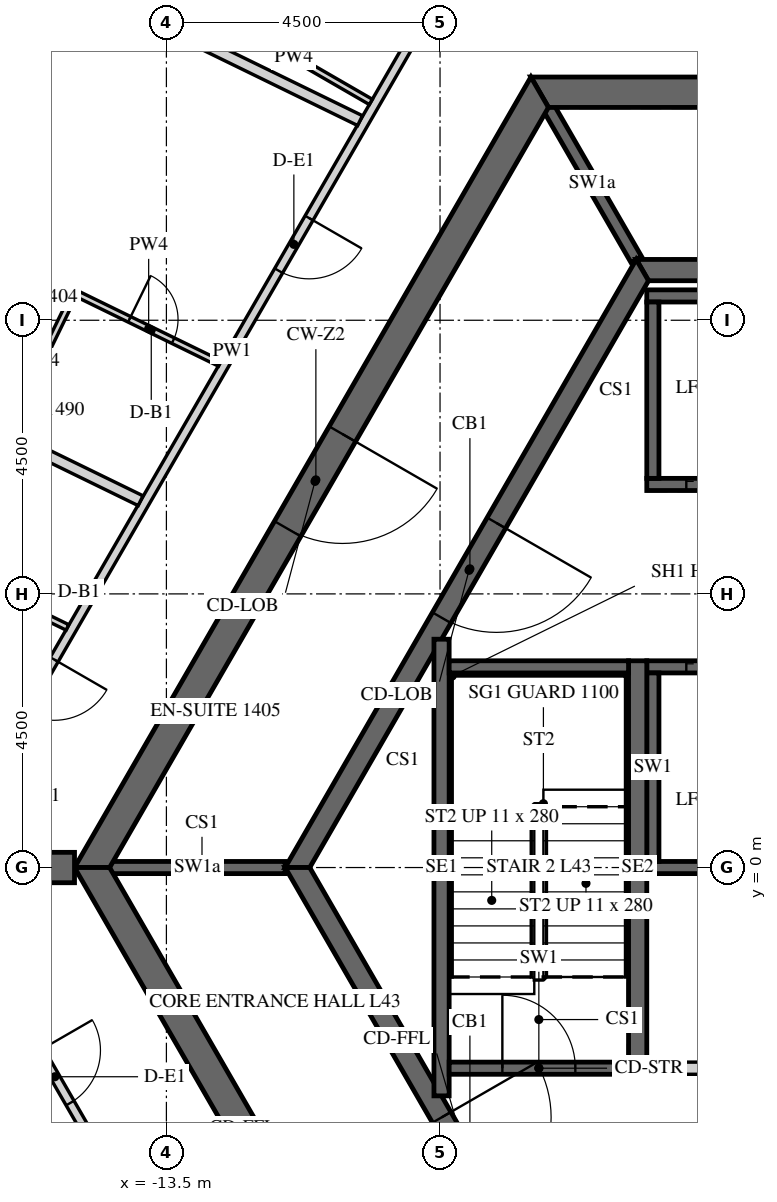
"""IFC4 building model, lengths in metres.
Left out: names, types, materials, properties, quantities, classifications, styles, units other than length and angle.
Written with IfcOpenShell. Run it as: python <this file> out.ifc"""

import sys

from ifc_helpers import new_model, si_unit, direction, frame, frame_2d, origin, place, context, subcontext, project, spatial, polyline, rectangle, outline, extrude, element, fill, save


model = new_model("IFC4")
c1 = context("Model", 3, precision=1e-05, world=origin(), true_north=direction((0.0, 1.0)))
c2 = subcontext(c1, "Body", "Model", "MODEL_VIEW")
j1 = project(units=[si_unit("LENGTHUNIT", "METRE"), si_unit("PLANEANGLEUNIT", "RADIAN")], contexts=[c1])
p1 = place(None, origin())
s1 = spatial("IfcSite", under=j1, at=p1, CompositionType="ELEMENT")
p2 = place(p1, origin())
s2 = spatial("IfcBuilding", under=s1, at=p2, CompositionType="ELEMENT")
p3 = place(p2, frame((0.0, 0.0, 183.9)))
s3 = spatial("IfcBuildingStorey", under=s2, at=p3, CompositionType="ELEMENT", Elevation=183.9)
p4 = place(p3, frame((-7.361, 12.75, -0.15), z_axis=(0.0, 0.0, 1.0), x_axis=(-0.50000571537, -0.866022103989, 0.0)))
e1 = element("IfcWall", 1, at=p4, inside=s3, PredefinedType="SHEAR", context=c2, shape_type="SweptSolid", body=[
    extrude(outline(polyline([(-0.144, -0.25), (14.867, -0.25), (14.578, 0.25), (0.144, 0.25), (-0.144, -0.25)])), origin(), (0.0, 0.0, 1.0), 3.9),
])
p5 = place(p4, frame((6.49, 0.0, 0.15)))
e2 = element("IfcOpeningElement", 2, at=p5, cuts=e1, PredefinedType="OPENING", context=c2, shape_type="SweptSolid", body=[
    extrude(rectangle(XDim=1.8, YDim=2.4, at=frame_2d((0.9, 1.2))), frame((0.0, 0.26, 0.0), z_axis=(0.0, -1.0, 0.0), x_axis=(1.0, 0.0, 0.0)), (0.0, 0.0, 1.0), 0.52),
])
p6 = place(p3, frame((-14.722, 0.0, -0.15), z_axis=(0.0, 0.0, 1.0), x_axis=(0.50000571537, -0.866022103989, 0.0)))
e3 = element("IfcWall", 3, at=p6, inside=s3, PredefinedType="SHEAR", context=c2, shape_type="SweptSolid", body=[
    extrude(outline(polyline([(-0.144, -0.25), (14.867, -0.25), (14.578, 0.25), (0.144, 0.25), (-0.144, -0.25)])), origin(), (0.0, 0.0, 1.0), 3.9),
])
p7 = place(p6, frame((6.432, 0.0, 0.15)))
e4 = element("IfcOpeningElement", 4, at=p7, cuts=e3, PredefinedType="OPENING", context=c2, shape_type="SweptSolid", body=[
    extrude(rectangle(XDim=1.8, YDim=2.4, at=frame_2d((0.9, 1.2))), frame((0.0, 0.26, 0.0), z_axis=(0.0, -1.0, 0.0), x_axis=(1.0, 0.0, 0.0)), (0.0, 0.0, 1.0), 0.52),
])
p8 = place(p3, frame((7.361, 12.75, -0.15), z_axis=(0.0, 0.0, 1.0), x_axis=(-1.0, 0.0, 0.0)))
e5 = element("IfcWall", 5, at=p8, inside=s3, PredefinedType="SHEAR", context=c2, shape_type="SweptSolid", body=[
    extrude(outline(polyline([(-0.144, -0.25), (14.866, -0.25), (14.578, 0.25), (0.144, 0.25), (-0.144, -0.25)])), origin(), (0.0, 0.0, 1.0), 3.9),
])
p9 = place(p8, frame((6.761, 0.0, 0.15)))
e6 = element("IfcOpeningElement", 6, at=p9, cuts=e5, PredefinedType="OPENING", context=c2, shape_type="SweptSolid", body=[
    extrude(rectangle(XDim=1.2, YDim=2.4, at=frame_2d((0.6, 1.2))), frame((0.0, 0.26, 0.0), z_axis=(0.0, -1.0, 0.0), x_axis=(1.0, 0.0, 0.0)), (0.0, 0.0, 1.0), 0.52),
])
p10 = place(p3, frame((-15.011, 0.0, -0.15), z_axis=(0.0, 0.0, 1.0), x_axis=(-1.0, 0.0, 0.0)))
e7 = element("IfcWall", 7, at=p10, inside=s3, PredefinedType="SHEAR", context=c2, shape_type="SweptSolid", body=[
    extrude(rectangle(XDim=15.424, YDim=0.5, at=frame_2d((7.712, 0.0))), origin(), (0.0, 0.0, 1.0), 3.9),
])
p11 = place(p10, frame((6.812, 0.0, 0.15)))
e8 = element("IfcOpeningElement", 8, at=p11, cuts=e7, PredefinedType="OPENING", context=c2, shape_type="SweptSolid", body=[
    extrude(rectangle(XDim=1.8, YDim=2.4, at=frame_2d((0.9, 1.2))), frame((0.0, 0.26, 0.0), z_axis=(0.0, -1.0, 0.0), x_axis=(1.0, 0.0, 0.0)), (0.0, 0.0, 1.0), 0.52),
])
p12 = place(p3, frame((-5.673, 9.825, -0.15), z_axis=(0.0, 0.0, 1.0), x_axis=(-0.499995046907, -0.866028263435, 0.0)))
e9 = element("IfcWall", 9, at=p12, inside=s3, PredefinedType="SHEAR", context=c2, shape_type="SweptSolid", body=[
    extrude(outline(polyline([(-0.101, -0.175), (11.446, -0.175), (11.244, 0.175), (0.101, 0.175), (-0.101, -0.175)])), origin(), (0.0, 0.0, 1.0), 3.9),
])
p13 = place(p12, frame((4.801, 0.0, 0.15)))
e10 = element("IfcOpeningElement", 10, at=p13, cuts=e9, PredefinedType="OPENING", context=c2, shape_type="SweptSolid", body=[
    extrude(rectangle(XDim=1.8, YDim=2.4, at=frame_2d((0.9, 1.2))), frame((0.0, 0.185, 0.0), z_axis=(0.0, -1.0, 0.0), x_axis=(1.0, 0.0, 0.0)), (0.0, 0.0, 1.0), 0.37),
])
p14 = place(p3, frame((-11.345, 0.0, -0.15), z_axis=(0.0, 0.0, 1.0), x_axis=(0.499995046907, -0.866028263435, 0.0)))
e11 = element("IfcWall", 11, at=p14, inside=s3, PredefinedType="SHEAR", context=c2, shape_type="SweptSolid", body=[
    extrude(outline(polyline([(-0.101, -0.175), (11.446, -0.175), (11.244, 0.175), (0.101, 0.175), (-0.101, -0.175)])), origin(), (0.0, 0.0, 1.0), 3.9),
])
p15 = place(p14, frame((4.744, 0.0, 0.15)))
e12 = element("IfcOpeningElement", 12, at=p15, cuts=e11, PredefinedType="OPENING", context=c2, shape_type="SweptSolid", body=[
    extrude(rectangle(XDim=1.8, YDim=2.4, at=frame_2d((0.9, 1.2))), frame((0.0, 0.185, 0.0), z_axis=(0.0, -1.0, 0.0), x_axis=(1.0, 0.0, 0.0)), (0.0, 0.0, 1.0), 0.37),
])
p16 = place(p3, frame((5.673, 9.825, -0.15), z_axis=(0.0, 0.0, 1.0), x_axis=(-1.0, 0.0, 0.0)))
e13 = element("IfcWall", 13, at=p16, inside=s3, PredefinedType="SHEAR", context=c2, shape_type="SweptSolid", body=[
    extrude(outline(polyline([(-0.101, -0.175), (11.446, -0.175), (11.244, 0.175), (0.101, 0.175), (-0.101, -0.175)])), origin(), (0.0, 0.0, 1.0), 3.9),
])
p17 = place(p3, frame((-5.6, 6.3, -0.25), z_axis=(0.0, 0.0, 1.0), x_axis=(1.0, 0.0, 0.0)))
e14 = element("IfcWall", 14, at=p17, inside=s3, PredefinedType="SHEAR", context=c2, shape_type="SweptSolid", body=[
    extrude(rectangle(XDim=11.2, YDim=0.2, at=frame_2d((5.6, 0.0))), origin(), (0.0, 0.0, 1.0), 3.9),
])
p18 = place(p17, frame((8.45, 0.0, 0.25)))
e15 = element("IfcOpeningElement", 15, at=p18, cuts=e14, PredefinedType="OPENING", context=c2, shape_type="SweptSolid", body=[
    extrude(rectangle(XDim=0.9, YDim=2.1, at=frame_2d((0.45, 1.05))), frame((0.0, 0.11, 0.0), z_axis=(0.0, -1.0, 0.0), x_axis=(1.0, 0.0, 0.0)), (0.0, 0.0, 1.0), 0.22),
])
p19 = place(p17, frame((0.65, 0.0, 0.25)))
e16 = element("IfcOpeningElement", 16, at=p19, cuts=e14, PredefinedType="OPENING", context=c2, shape_type="SweptSolid", body=[
    extrude(rectangle(XDim=1.1, YDim=2.1, at=frame_2d((0.55, 1.05))), frame((0.0, 0.11, 0.0), z_axis=(0.0, -1.0, 0.0), x_axis=(1.0, 0.0, 0.0)), (0.0, 0.0, 1.0), 0.22),
])
p20 = place(p17, frame((2.85, 0.0, 0.25)))
e17 = element("IfcOpeningElement", 17, at=p20, cuts=e14, PredefinedType="OPENING", context=c2, shape_type="SweptSolid", body=[
    extrude(rectangle(XDim=1.1, YDim=2.1, at=frame_2d((0.55, 1.05))), frame((0.0, 0.11, 0.0), z_axis=(0.0, -1.0, 0.0), x_axis=(1.0, 0.0, 0.0)), (0.0, 0.0, 1.0), 0.22),
])
p21 = place(p17, frame((5.05, 0.0, 0.25)))
e18 = element("IfcOpeningElement", 18, at=p21, cuts=e14, PredefinedType="OPENING", context=c2, shape_type="SweptSolid", body=[
    extrude(rectangle(XDim=1.1, YDim=2.1, at=frame_2d((0.55, 1.05))), frame((0.0, 0.11, 0.0), z_axis=(0.0, -1.0, 0.0), x_axis=(1.0, 0.0, 0.0)), (0.0, 0.0, 1.0), 0.22),
])
p22 = place(p3, frame((-5.6, 9.4, -0.25), z_axis=(0.0, 0.0, 1.0), x_axis=(1.0, 0.0, 0.0)))
e19 = element("IfcWall", 19, at=p22, inside=s3, PredefinedType="SHEAR", context=c2, shape_type="SweptSolid", body=[
    extrude(rectangle(XDim=11.2, YDim=0.2, at=frame_2d((5.6, 0.0))), origin(), (0.0, 0.0, 1.0), 3.9),
])
p23 = place(p3, frame((-5.5, 6.4, -0.25), z_axis=(0.0, 0.0, 1.0), x_axis=(0.0, 1.0, 0.0)))
e20 = element("IfcWall", 20, at=p23, inside=s3, PredefinedType="SHEAR", context=c2, shape_type="SweptSolid", body=[
    extrude(rectangle(XDim=2.9, YDim=0.2, at=frame_2d((1.45, 0.0))), origin(), (0.0, 0.0, 1.0), 3.9),
])
p24 = place(p3, frame((-5.6, 3.3, -0.25), z_axis=(0.0, 0.0, 1.0), x_axis=(1.0, 0.0, 0.0)))
e21 = element("IfcWall", 21, at=p24, inside=s3, PredefinedType="SHEAR", context=c2, shape_type="SweptSolid", body=[
    extrude(rectangle(XDim=11.2, YDim=0.2, at=frame_2d((5.6, 0.0))), origin(), (0.0, 0.0, 1.0), 3.9),
])
p25 = place(p24, frame((0.65, 0.0, 0.25)))
e22 = element("IfcOpeningElement", 22, at=p25, cuts=e21, PredefinedType="OPENING", context=c2, shape_type="SweptSolid", body=[
    extrude(rectangle(XDim=1.1, YDim=2.1, at=frame_2d((0.55, 1.05))), frame((0.0, 0.11, 0.0), z_axis=(0.0, -1.0, 0.0), x_axis=(1.0, 0.0, 0.0)), (0.0, 0.0, 1.0), 0.22),
])
p26 = place(p24, frame((2.85, 0.0, 0.25)))
e23 = element("IfcOpeningElement", 23, at=p26, cuts=e21, PredefinedType="OPENING", context=c2, shape_type="SweptSolid", body=[
    extrude(rectangle(XDim=1.1, YDim=2.1, at=frame_2d((0.55, 1.05))), frame((0.0, 0.11, 0.0), z_axis=(0.0, -1.0, 0.0), x_axis=(1.0, 0.0, 0.0)), (0.0, 0.0, 1.0), 0.22),
])
p27 = place(p24, frame((5.05, 0.0, 0.25)))
e24 = element("IfcOpeningElement", 24, at=p27, cuts=e21, PredefinedType="OPENING", context=c2, shape_type="SweptSolid", body=[
    extrude(rectangle(XDim=1.1, YDim=2.1, at=frame_2d((0.55, 1.05))), frame((0.0, 0.11, 0.0), z_axis=(0.0, -1.0, 0.0), x_axis=(1.0, 0.0, 0.0)), (0.0, 0.0, 1.0), 0.22),
])
p28 = place(p24, frame((7.25, 0.0, 0.25)))
e25 = element("IfcOpeningElement", 25, at=p28, cuts=e21, PredefinedType="OPENING", context=c2, shape_type="SweptSolid", body=[
    extrude(rectangle(XDim=1.1, YDim=2.1, at=frame_2d((0.55, 1.05))), frame((0.0, 0.11, 0.0), z_axis=(0.0, -1.0, 0.0), x_axis=(1.0, 0.0, 0.0)), (0.0, 0.0, 1.0), 0.22),
])
p29 = place(p24, frame((9.45, 0.0, 0.25)))
e26 = element("IfcOpeningElement", 26, at=p29, cuts=e21, PredefinedType="OPENING", context=c2, shape_type="SweptSolid", body=[
    extrude(rectangle(XDim=1.1, YDim=2.1, at=frame_2d((0.55, 1.05))), frame((0.0, 0.11, 0.0), z_axis=(0.0, -1.0, 0.0), x_axis=(1.0, 0.0, 0.0)), (0.0, 0.0, 1.0), 0.22),
])
p30 = place(p3, frame((-5.6, 0.0, -0.25), z_axis=(0.0, 0.0, 1.0), x_axis=(1.0, 0.0, 0.0)))
e27 = element("IfcWall", 27, at=p30, inside=s3, PredefinedType="SHEAR", context=c2, shape_type="SweptSolid", body=[
    extrude(rectangle(XDim=11.2, YDim=0.2, at=frame_2d((5.6, 0.0))), origin(), (0.0, 0.0, 1.0), 3.9),
])
p31 = place(p3, frame((-5.5, 0.1, -0.25), z_axis=(0.0, 0.0, 1.0), x_axis=(0.0, 1.0, 0.0)))
e28 = element("IfcWall", 28, at=p31, inside=s3, PredefinedType="SHEAR", context=c2, shape_type="SweptSolid", body=[
    extrude(rectangle(XDim=3.1, YDim=0.2, at=frame_2d((1.55, 0.0))), origin(), (0.0, 0.0, 1.0), 3.9),
])
p32 = place(p3, frame((-5.6, -3.3, 0.0), z_axis=(0.0, 0.0, 1.0), x_axis=(1.0, 0.0, 0.0)))
e29 = element("IfcWall", 29, at=p32, inside=s3, PredefinedType="PARTITIONING", context=c2, shape_type="SweptSolid", body=[
    extrude(rectangle(XDim=5.5, YDim=0.2, at=frame_2d((2.75, 0.0))), origin(), (0.0, 0.0, 1.0), 3.65),
])
p33 = place(p32, frame((2.3, 0.0, 0.0)))
e30 = element("IfcOpeningElement", 30, at=p33, cuts=e29, PredefinedType="OPENING", context=c2, shape_type="SweptSolid", body=[
    extrude(rectangle(XDim=0.9, YDim=2.1, at=frame_2d((0.45, 1.05))), frame((0.0, 0.11, 0.0), z_axis=(0.0, -1.0, 0.0), x_axis=(1.0, 0.0, 0.0)), (0.0, 0.0, 1.0), 0.22),
])
for number, where, z_axis, x_axis in (
    (31, (-5.773, 10.0, -0.15), (0.0, 0.0, 1.0), (-0.5, 0.866, 0.0)),
    (32, (-11.547, 0.0, -0.15), (0.0, 0.0, 1.0), (-1.0, 0.0, 0.0)),
):
    element("IfcWall", number, at=place(p3, frame(where, z_axis=z_axis, x_axis=x_axis)), inside=s3, PredefinedType="SHEAR", context=c2, shape_type="SweptSolid", body=[
        extrude(rectangle(XDim=2.887, YDim=0.2, at=frame_2d((1.443, 0.0))), origin(), (0.0, 0.0, 1.0), 3.9),
    ])
p34 = place(p3, frame((-5.75, -3.4, -0.25), z_axis=(0.0, 0.0, 1.0), x_axis=(0.0, 1.0, 0.0)))
e33 = element("IfcWall", 33, at=p34, inside=s3, PredefinedType="SHEAR", context=c2, shape_type="SweptSolid", body=[
    extrude(rectangle(XDim=6.8, YDim=0.3, at=frame_2d((3.4, 0.0))), origin(), (0.0, 0.0, 1.0), 3.9),
])
p35 = place(p3, frame((-8.975, -3.755, -0.25), z_axis=(0.0, 0.0, 1.0), x_axis=(0.0, 1.0, 0.0)))
e34 = element("IfcWall", 34, at=p35, inside=s3, PredefinedType="SHEAR", context=c2, shape_type="SweptSolid", body=[
    extrude(rectangle(XDim=7.51, YDim=0.25, at=frame_2d((3.755, 0.0))), origin(), (0.0, 0.0, 1.0), 3.9),
])
p36 = place(p3, frame((-8.85, 3.3, -0.25), z_axis=(0.0, 0.0, 1.0), x_axis=(1.0, 0.0, 0.0)))
e35 = element("IfcWall", 35, at=p36, inside=s3, PredefinedType="SHEAR", context=c2, shape_type="SweptSolid", body=[
    extrude(rectangle(XDim=2.95, YDim=0.2, at=frame_2d((1.475, 0.0))), origin(), (0.0, 0.0, 1.0), 3.9),
])
p37 = place(p3, frame((-8.85, -3.3, -0.25), z_axis=(0.0, 0.0, 1.0), x_axis=(1.0, 0.0, 0.0)))
e36 = element("IfcWall", 36, at=p37, inside=s3, PredefinedType="SHEAR", context=c2, shape_type="SweptSolid", body=[
    extrude(rectangle(XDim=2.95, YDim=0.2, at=frame_2d((1.475, 0.0))), origin(), (0.0, 0.0, 1.0), 3.9),
])
p38 = place(p37, frame((0.875, 0.0, 0.25)))
e37 = element("IfcOpeningElement", 37, at=p38, cuts=e36, PredefinedType="OPENING", context=c2, shape_type="SweptSolid", body=[
    extrude(rectangle(XDim=1.2, YDim=2.4, at=frame_2d((0.6, 1.2))), frame((0.0, 0.11, 0.0), z_axis=(0.0, -1.0, 0.0), x_axis=(1.0, 0.0, 0.0)), (0.0, 0.0, 1.0), 0.22),
])
p39 = place(p3, frame((-8.704, 14.925, 0.0), z_axis=(0.0, 0.0, 1.0), x_axis=(-0.499998228944, -0.866026426302, 0.0)))
e38 = element("IfcWall", 38, at=p39, inside=s3, PredefinedType="PARTITIONING", context=c2, shape_type="SweptSolid", body=[
    extrude(rectangle(XDim=14.867, YDim=0.15, at=frame_2d((7.433, 0.0))), origin(), (0.0, 0.0, 1.0), 2.988),
])
p40 = place(p39, frame((4.901, 0.0, 0.0)))
e39 = element("IfcOpeningElement", 39, at=p40, cuts=e38, PredefinedType="OPENING", context=c2, shape_type="SweptSolid", body=[
    extrude(rectangle(XDim=1.0, YDim=2.1, at=frame_2d((0.5, 1.05))), frame((0.0, 0.085, 0.0), z_axis=(0.0, -1.0, 0.0), x_axis=(1.0, 0.0, 0.0)), (0.0, 0.0, 1.0), 0.17),
])
p41 = place(p39, frame((13.284, 0.0, 0.0)))
e40 = element("IfcOpeningElement", 40, at=p41, cuts=e38, PredefinedType="OPENING", context=c2, shape_type="SweptSolid", body=[
    extrude(rectangle(XDim=1.0, YDim=2.1, at=frame_2d((0.5, 1.05))), frame((0.0, 0.085, 0.0), z_axis=(0.0, -1.0, 0.0), x_axis=(1.0, 0.0, 0.0)), (0.0, 0.0, 1.0), 0.17),
])
p42 = place(p3, frame((-16.094, -2.125, 0.0), z_axis=(0.0, 0.0, 1.0), x_axis=(0.500010545262, -0.866019315389, 0.0)))
e41 = element("IfcWall", 41, at=p42, inside=s3, PredefinedType="PARTITIONING", context=c2, shape_type="SweptSolid", body=[
    extrude(rectangle(XDim=14.867, YDim=0.15, at=frame_2d((7.434, 0.0))), origin(), (0.0, 0.0, 1.0), 2.988),
])
p43 = place(p42, frame((1.019, 0.0, 0.0)))
e42 = element("IfcOpeningElement", 42, at=p43, cuts=e41, PredefinedType="OPENING", context=c2, shape_type="SweptSolid", body=[
    extrude(rectangle(XDim=1.0, YDim=2.1, at=frame_2d((0.5, 1.05))), frame((0.0, 0.085, 0.0), z_axis=(0.0, -1.0, 0.0), x_axis=(1.0, 0.0, 0.0)), (0.0, 0.0, 1.0), 0.17),
])
p44 = place(p42, frame((9.824, 0.0, 0.0)))
e43 = element("IfcOpeningElement", 43, at=p44, cuts=e41, PredefinedType="OPENING", context=c2, shape_type="SweptSolid", body=[
    extrude(rectangle(XDim=1.0, YDim=2.1, at=frame_2d((0.5, 1.05))), frame((0.0, 0.085, 0.0), z_axis=(0.0, -1.0, 0.0), x_axis=(1.0, 0.0, 0.0)), (0.0, 0.0, 1.0), 0.17),
])
p45 = place(p42, frame((13.717, 0.0, 0.0)))
e44 = element("IfcOpeningElement", 44, at=p45, cuts=e41, PredefinedType="OPENING", context=c2, shape_type="SweptSolid", body=[
    extrude(rectangle(XDim=1.0, YDim=2.1, at=frame_2d((0.5, 1.05))), frame((0.0, 0.085, 0.0), z_axis=(0.0, -1.0, 0.0), x_axis=(1.0, 0.0, 0.0)), (0.0, 0.0, 1.0), 0.17),
])
p46 = place(p3, frame((-10.138, 12.591, 0.0), z_axis=(0.0, 0.0, 1.0), x_axis=(-0.866025730634, 0.499999433879, 0.0)))
e45 = element("IfcWall", 45, at=p46, inside=s3, PredefinedType="PARTITIONING", context=c2, shape_type="SweptSolid", body=[
    extrude(rectangle(XDim=2.925, YDim=0.1, at=frame_2d((1.462, 0.0))), origin(), (0.0, 0.0, 1.0), 2.988),
])
p47 = place(p3, frame((-21.815, 17.892, 0.0), z_axis=(0.0, 0.0, 1.0), x_axis=(0.898799253997, -0.438360469265, 0.0)))
e46 = element("IfcWall", 46, at=p47, inside=s3, PredefinedType="PARTITIONING", context=c2, shape_type="SweptSolid", body=[
    extrude(rectangle(XDim=12.794, YDim=0.18, at=frame_2d((6.397, 0.0))), origin(), (0.0, 0.0, 1.0), 2.988),
])
p48 = place(p3, frame((-16.108, 7.198, 0.0), z_axis=(0.0, 0.0, 1.0), x_axis=(0.438398718232, 0.898780598284, 0.0)))
e47 = element("IfcWall", 47, at=p48, inside=s3, PredefinedType="PARTITIONING", context=c2, shape_type="SweptSolid", body=[
    extrude(rectangle(XDim=2.51, YDim=0.1, at=frame_2d((1.255, 0.0))), origin(), (0.0, 0.0, 1.0), 2.988),
])
p49 = place(p3, frame((-14.962, 9.432, 0.0), z_axis=(0.0, 0.0, 1.0), x_axis=(0.898770247069, -0.438419939081, 0.0)))
e48 = element("IfcWall", 48, at=p49, inside=s3, PredefinedType="PARTITIONING", context=c2, shape_type="SweptSolid", body=[
    extrude(rectangle(XDim=2.605, YDim=0.1, at=frame_2d((1.302, 0.0))), origin(), (0.0, 0.0, 1.0), 2.988),
])
p50 = place(p49, frame((0.95, 0.0, 0.0)))
e49 = element("IfcOpeningElement", 49, at=p50, cuts=e48, PredefinedType="OPENING", context=c2, shape_type="SweptSolid", body=[
    extrude(rectangle(XDim=0.8, YDim=2.1, at=frame_2d((0.4, 1.05))), frame((0.0, 0.06, 0.0), z_axis=(0.0, -1.0, 0.0), x_axis=(1.0, 0.0, 0.0)), (0.0, 0.0, 1.0), 0.12),
])
p51 = place(p3, frame((-24.971, 11.42, 0.0), z_axis=(0.0, 0.0, 1.0), x_axis=(0.898797462081, -0.438364143329, 0.0)))
e50 = element("IfcWall", 50, at=p51, inside=s3, PredefinedType="PARTITIONING", context=c2, shape_type="SweptSolid", body=[
    extrude(rectangle(XDim=12.291, YDim=0.18, at=frame_2d((6.145, 0.0))), origin(), (0.0, 0.0, 1.0), 2.988),
])
p52 = place(p3, frame((-15.127, 3.949, 0.0), z_axis=(0.0, 0.0, 1.0), x_axis=(-0.898788314205, 0.438382899128, 0.0)))
e51 = element("IfcWall", 51, at=p52, inside=s3, PredefinedType="PARTITIONING", context=c2, shape_type="SweptSolid", body=[
    extrude(rectangle(XDim=2.716, YDim=0.1, at=frame_2d((1.358, 0.0))), origin(), (0.0, 0.0, 1.0), 2.988),
])
p53 = place(p52, frame((0.916, 0.0, 0.0)))
e52 = element("IfcOpeningElement", 52, at=p53, cuts=e51, PredefinedType="OPENING", context=c2, shape_type="SweptSolid", body=[
    extrude(rectangle(XDim=0.8, YDim=2.1, at=frame_2d((0.4, 1.05))), frame((0.0, 0.06, 0.0), z_axis=(0.0, -1.0, 0.0), x_axis=(1.0, 0.0, 0.0)), (0.0, 0.0, 1.0), 0.12),
])
p54 = place(p5, origin())
e53 = element("IfcDoor", 53, at=p54, inside=s3, OperationType="DOUBLE_DOOR_SINGLE_SWING", PredefinedType="DOOR", context=c2, shape_type="SweptSolid", body=[
    extrude(rectangle(XDim=1.8, YDim=2.4, at=frame_2d((0.9, 1.2))), frame((0.0, 0.025, 0.0), z_axis=(0.0, -1.0, 0.0), x_axis=(1.0, 0.0, 0.0)), (0.0, 0.0, 1.0), 0.05),
])
fill(e2, e53)
p55 = place(p13, origin())
e54 = element("IfcDoor", 54, at=p55, inside=s3, OperationType="DOUBLE_DOOR_SINGLE_SWING", PredefinedType="DOOR", context=c2, shape_type="SweptSolid", body=[
    extrude(rectangle(XDim=1.8, YDim=2.4, at=frame_2d((0.9, 1.2))), frame((0.0, 0.025, 0.0), z_axis=(0.0, -1.0, 0.0), x_axis=(1.0, 0.0, 0.0)), (0.0, 0.0, 1.0), 0.05),
])
fill(e10, e54)
p56 = place(p15, origin())
e55 = element("IfcDoor", 55, at=p56, inside=s3, OperationType="DOUBLE_DOOR_SINGLE_SWING", PredefinedType="DOOR", context=c2, shape_type="SweptSolid", body=[
    extrude(rectangle(XDim=1.8, YDim=2.4, at=frame_2d((0.9, 1.2))), frame((0.0, 0.025, 0.0), z_axis=(0.0, -1.0, 0.0), x_axis=(1.0, 0.0, 0.0)), (0.0, 0.0, 1.0), 0.05),
])
fill(e12, e55)
p57 = place(p38, origin())
e56 = element("IfcDoor", 56, at=p57, inside=s3, OperationType="SINGLE_SWING_LEFT", PredefinedType="DOOR", context=c2, shape_type="SweptSolid", body=[
    extrude(rectangle(XDim=1.2, YDim=2.4, at=frame_2d((0.6, 1.2))), frame((0.0, 0.025, 0.0), z_axis=(0.0, -1.0, 0.0), x_axis=(1.0, 0.0, 0.0)), (0.0, 0.0, 1.0), 0.05),
])
fill(e37, e56)
p58 = place(p19, origin())
e57 = element("IfcDoor", 57, at=p58, inside=s3, OperationType="SLIDING_TO_LEFT", PredefinedType="DOOR", context=c2, shape_type="SweptSolid", body=[
    extrude(rectangle(XDim=1.1, YDim=2.1, at=frame_2d((0.55, 1.05))), frame((0.0, 0.025, 0.0), z_axis=(0.0, -1.0, 0.0), x_axis=(1.0, 0.0, 0.0)), (0.0, 0.0, 1.0), 0.05),
])
fill(e16, e57)
p59 = place(p25, origin())
e58 = element("IfcDoor", 58, at=p59, inside=s3, OperationType="SLIDING_TO_LEFT", PredefinedType="DOOR", context=c2, shape_type="SweptSolid", body=[
    extrude(rectangle(XDim=1.1, YDim=2.1, at=frame_2d((0.55, 1.05))), frame((0.0, 0.025, 0.0), z_axis=(0.0, -1.0, 0.0), x_axis=(1.0, 0.0, 0.0)), (0.0, 0.0, 1.0), 0.05),
])
fill(e22, e58)
p60 = place(p40, origin())
e59 = element("IfcDoor", 59, at=p60, inside=s3, OperationType="SINGLE_SWING_RIGHT", PredefinedType="DOOR", context=c2, shape_type="SweptSolid", body=[
    extrude(rectangle(XDim=1.0, YDim=2.1, at=frame_2d((0.5, 1.05))), frame((0.0, 0.025, 0.0), z_axis=(0.0, -1.0, 0.0), x_axis=(1.0, 0.0, 0.0)), (0.0, 0.0, 1.0), 0.05),
])
fill(e39, e59)
p61 = place(p50, origin())
e60 = element("IfcDoor", 60, at=p61, inside=s3, OperationType="SINGLE_SWING_LEFT", PredefinedType="DOOR", context=c2, shape_type="SweptSolid", body=[
    extrude(rectangle(XDim=0.8, YDim=2.1, at=frame_2d((0.4, 1.05))), frame((0.0, 0.025, 0.0), z_axis=(0.0, -1.0, 0.0), x_axis=(1.0, 0.0, 0.0)), (0.0, 0.0, 1.0), 0.05),
])
fill(e49, e60)
p62 = place(p41, origin())
e61 = element("IfcDoor", 61, at=p62, inside=s3, OperationType="SINGLE_SWING_LEFT", PredefinedType="DOOR", context=c2, shape_type="SweptSolid", body=[
    extrude(rectangle(XDim=1.0, YDim=2.1, at=frame_2d((0.5, 1.05))), frame((0.0, 0.025, 0.0), z_axis=(0.0, -1.0, 0.0), x_axis=(1.0, 0.0, 0.0)), (0.0, 0.0, 1.0), 0.05),
])
fill(e40, e61)
p63 = place(p43, origin())
e62 = element("IfcDoor", 62, at=p63, inside=s3, OperationType="SINGLE_SWING_RIGHT", PredefinedType="DOOR", context=c2, shape_type="SweptSolid", body=[
    extrude(rectangle(XDim=1.0, YDim=2.1, at=frame_2d((0.5, 1.05))), frame((0.0, 0.025, 0.0), z_axis=(0.0, -1.0, 0.0), x_axis=(1.0, 0.0, 0.0)), (0.0, 0.0, 1.0), 0.05),
])
fill(e42, e62)
save(model, sys.argv[1])
